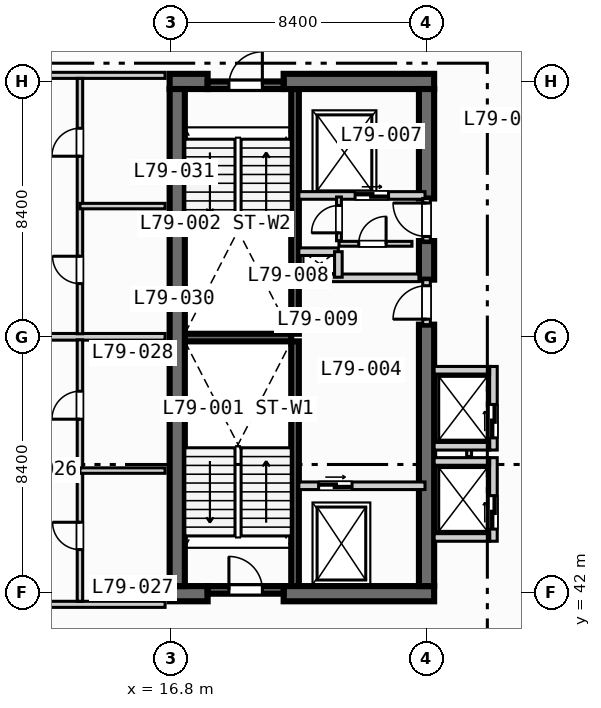
"""IFC4 building model, lengths in metres.
Left out: names, types, materials, properties, quantities, classifications, styles, units other than length and angle.
Written with IfcOpenShell. Run it as: python <this file> out.ifc"""

import sys

from ifc_helpers import new_model, si_unit, direction, frame, frame_2d, origin, place, context, subcontext, project, spatial, rectangle, extrude, element, fill, save


model = new_model("IFC4")
c1 = context("Model", 3, precision=1e-05, world=origin(), true_north=direction((0.0, 1.0)))
c2 = subcontext(c1, "Body", "Model", "MODEL_VIEW")
j1 = project(units=[si_unit("LENGTHUNIT", "METRE"), si_unit("PLANEANGLEUNIT", "RADIAN")], contexts=[c1])
p1 = place(None, origin())
s1 = spatial("IfcSite", under=j1, at=p1, CompositionType="ELEMENT")
p2 = place(p1, origin())
s2 = spatial("IfcBuilding", under=s1, at=p2, CompositionType="ELEMENT")
p3 = place(p2, frame((0.0, 0.0, 320.3)))
s3 = spatial("IfcBuildingStorey", under=s2, at=p3, CompositionType="ELEMENT", Elevation=320.3)
for number, where, z_axis, x_axis in (
    (1, (20.875, 42.2, 0.0), (0.0, 0.0, 1.0), (0.0, 1.0, 0.0)),
    (2, (20.875, 50.5, 0.0), (0.0, 0.0, 1.0), (0.0, 1.0, 0.0)),
):
    element("IfcWall", number, at=place(p3, frame(where, z_axis=z_axis, x_axis=x_axis)), inside=s3, PredefinedType="SOLIDWALL", context=c2, shape_type="SweptSolid", body=[
        extrude(rectangle(XDim=8.05, YDim=0.25, at=frame_2d((4.025, 0.0))), origin(), (0.0, 0.0, 1.0), 3.67),
    ])
p4 = place(p3, frame((17.25, 50.375, 0.0), z_axis=(0.0, 0.0, 1.0), x_axis=(1.0, 0.0, 0.0)))
e3 = element("IfcWall", 3, at=p4, inside=s3, PredefinedType="SOLIDWALL", context=c2, shape_type="SweptSolid", body=[
    extrude(rectangle(XDim=3.5, YDim=0.25, at=frame_2d((1.75, 0.0))), origin(), (0.0, 0.0, 1.0), 3.67),
])
p5 = place(p3, frame((16.75, 41.95, 0.0), z_axis=(0.0, 0.0, 1.0), x_axis=(1.0, 0.0, 0.0)))
e4 = element("IfcWall", 4, at=p5, inside=s3, PredefinedType="SHEAR", context=c2, shape_type="SweptSolid", body=[
    extrude(rectangle(XDim=1.25, YDim=0.5, at=frame_2d((0.625, 0.0))), origin(), (0.0, 0.0, 1.0), 3.67),
])
p6 = place(p3, frame((20.5, 41.95, 0.0), z_axis=(0.0, 0.0, 1.0), x_axis=(1.0, 0.0, 0.0)))
e5 = element("IfcWall", 5, at=p6, inside=s3, PredefinedType="SHEAR", context=c2, shape_type="SweptSolid", body=[
    extrude(rectangle(XDim=4.95, YDim=0.5, at=frame_2d((2.475, 0.0))), origin(), (0.0, 0.0, 1.0), 3.67),
])
p7 = place(p3, frame((16.75, 58.8, 0.0), z_axis=(0.0, 0.0, 1.0), x_axis=(1.0, 0.0, 0.0)))
e6 = element("IfcWall", 6, at=p7, inside=s3, PredefinedType="SHEAR", context=c2, shape_type="SweptSolid", body=[
    extrude(rectangle(XDim=1.25, YDim=0.5, at=frame_2d((0.625, 0.0))), origin(), (0.0, 0.0, 1.0), 3.67),
])
p8 = place(p3, frame((20.5, 58.8, 0.0), z_axis=(0.0, 0.0, 1.0), x_axis=(1.0, 0.0, 0.0)))
e7 = element("IfcWall", 7, at=p8, inside=s3, PredefinedType="SHEAR", context=c2, shape_type="SweptSolid", body=[
    extrude(rectangle(XDim=4.95, YDim=0.5, at=frame_2d((2.475, 0.0))), origin(), (0.0, 0.0, 1.0), 3.67),
])
p9 = place(p3, frame((17.0, 42.2, 0.0), z_axis=(0.0, 0.0, 1.0), x_axis=(0.0, 1.0, 0.0)))
e8 = element("IfcWall", 8, at=p9, inside=s3, PredefinedType="SHEAR", context=c2, shape_type="SweptSolid", body=[
    extrude(rectangle(XDim=16.35, YDim=0.5, at=frame_2d((8.175, 0.0))), origin(), (0.0, 0.0, 1.0), 3.67),
])
p10 = place(p3, frame((25.2, 42.2, 0.0), z_axis=(0.0, 0.0, 1.0), x_axis=(0.0, 1.0, 0.0)))
e9 = element("IfcWall", 9, at=p10, inside=s3, PredefinedType="SHEAR", context=c2, shape_type="SweptSolid", body=[
    extrude(rectangle(XDim=8.6, YDim=0.5, at=frame_2d((4.3, 0.0))), origin(), (0.0, 0.0, 1.0), 3.67),
])
p11 = place(p3, frame((25.2, 52.28, 0.0), z_axis=(0.0, 0.0, 1.0), x_axis=(0.0, 1.0, 0.0)))
e10 = element("IfcWall", 10, at=p11, inside=s3, PredefinedType="SHEAR", context=c2, shape_type="SweptSolid", body=[
    extrude(rectangle(XDim=1.27, YDim=0.5, at=frame_2d((0.635, 0.0))), origin(), (0.0, 0.0, 1.0), 3.67),
])
p12 = place(p3, frame((25.2, 54.95, 0.0), z_axis=(0.0, 0.0, 1.0), x_axis=(0.0, 1.0, 0.0)))
e11 = element("IfcWall", 11, at=p12, inside=s3, PredefinedType="SHEAR", context=c2, shape_type="SweptSolid", body=[
    extrude(rectangle(XDim=3.6, YDim=0.5, at=frame_2d((1.8, 0.0))), origin(), (0.0, 0.0, 1.0), 3.67),
])
p13 = place(p3, frame((18.0, 42.075, 0.0), z_axis=(0.0, 0.0, 1.0), x_axis=(1.0, 0.0, 0.0)))
e12 = element("IfcWall", 12, at=p13, inside=s3, PredefinedType="SOLIDWALL", context=c2, shape_type="SweptSolid", body=[
    extrude(rectangle(XDim=2.5, YDim=0.25, at=frame_2d((1.25, 0.0))), origin(), (0.0, 0.0, 1.0), 3.67),
])
p14 = place(p13, frame((0.7, 0.0, 0.0)))
e13 = element("IfcOpeningElement", 13, at=p14, cuts=e12, PredefinedType="OPENING", context=c2, shape_type="SweptSolid", body=[
    extrude(rectangle(XDim=1.1, YDim=2.15, at=frame_2d((0.55, 1.075))), frame((0.0, 0.135, 0.0), z_axis=(0.0, -1.0, 0.0), x_axis=(1.0, 0.0, 0.0)), (0.0, 0.0, 1.0), 0.27),
])
p15 = place(p3, frame((18.0, 58.675, 0.0), z_axis=(0.0, 0.0, 1.0), x_axis=(1.0, 0.0, 0.0)))
e14 = element("IfcWall", 14, at=p15, inside=s3, PredefinedType="SOLIDWALL", context=c2, shape_type="SweptSolid", body=[
    extrude(rectangle(XDim=2.5, YDim=0.25, at=frame_2d((1.25, 0.0))), origin(), (0.0, 0.0, 1.0), 3.67),
])
p16 = place(p15, frame((0.7, 0.0, 0.0)))
e15 = element("IfcOpeningElement", 15, at=p16, cuts=e14, PredefinedType="OPENING", context=c2, shape_type="SweptSolid", body=[
    extrude(rectangle(XDim=1.1, YDim=2.15, at=frame_2d((0.55, 1.075))), frame((0.0, 0.135, 0.0), z_axis=(0.0, -1.0, 0.0), x_axis=(1.0, 0.0, 0.0)), (0.0, 0.0, 1.0), 0.27),
])
p17 = place(p3, frame((21.0, 45.5, 0.0), z_axis=(0.0, 0.0, 1.0), x_axis=(1.0, 0.0, 0.0)))
e16 = element("IfcWall", 16, at=p17, inside=s3, PredefinedType="SOLIDWALL", context=c2, shape_type="SweptSolid", body=[
    extrude(rectangle(XDim=4.15, YDim=0.25, at=frame_2d((2.075, 0.0))), origin(), (0.0, 0.0, 1.0), 3.67),
])
p18 = place(p17, frame((0.65, 0.0, 0.0)))
e17 = element("IfcOpeningElement", 17, at=p18, cuts=e16, PredefinedType="OPENING", context=c2, shape_type="SweptSolid", body=[
    extrude(rectangle(XDim=1.1, YDim=2.15, at=frame_2d((0.55, 1.075))), frame((0.0, 0.135, 0.0), z_axis=(0.0, -1.0, 0.0), x_axis=(1.0, 0.0, 0.0)), (0.0, 0.0, 1.0), 0.27),
])
p19 = place(p3, frame((25.2, 50.8, 0.0), z_axis=(0.0, 0.0, 1.0), x_axis=(0.0, 1.0, 0.0)))
e18 = element("IfcWall", 18, at=p19, inside=s3, PredefinedType="SOLIDWALL", context=c2, shape_type="SweptSolid", body=[
    extrude(rectangle(XDim=1.48, YDim=0.25, at=frame_2d((0.74, 0.0))), origin(), (0.0, 0.0, 1.0), 3.67),
])
p20 = place(p19, frame((0.18, 0.0, 0.0)))
e19 = element("IfcOpeningElement", 19, at=p20, cuts=e18, PredefinedType="OPENING", context=c2, shape_type="SweptSolid", body=[
    extrude(rectangle(XDim=1.1, YDim=2.15, at=frame_2d((0.55, 1.075))), frame((0.0, 0.135, 0.0), z_axis=(0.0, -1.0, 0.0), x_axis=(1.0, 0.0, 0.0)), (0.0, 0.0, 1.0), 0.27),
])
p21 = place(p3, frame((21.0, 52.34, 0.0), z_axis=(0.0, 0.0, 1.0), x_axis=(1.0, 0.0, 0.0)))
e20 = element("IfcWall", 20, at=p21, inside=s3, PredefinedType="SOLIDWALL", context=c2, shape_type="SweptSolid", body=[
    extrude(rectangle(XDim=3.95, YDim=0.25, at=frame_2d((1.975, 0.0))), origin(), (0.0, 0.0, 1.0), 3.67),
])
p22 = place(p3, frame((21.0, 55.05, 0.0), z_axis=(0.0, 0.0, 1.0), x_axis=(1.0, 0.0, 0.0)))
e21 = element("IfcWall", 21, at=p22, inside=s3, PredefinedType="SOLIDWALL", context=c2, shape_type="SweptSolid", body=[
    extrude(rectangle(XDim=4.15, YDim=0.25, at=frame_2d((2.075, 0.0))), origin(), (0.0, 0.0, 1.0), 3.67),
])
p23 = place(p22, frame((1.85, 0.0, 0.0)))
e22 = element("IfcOpeningElement", 22, at=p23, cuts=e21, PredefinedType="OPENING", context=c2, shape_type="SweptSolid", body=[
    extrude(rectangle(XDim=1.1, YDim=2.15, at=frame_2d((0.55, 1.075))), frame((0.0, 0.135, 0.0), z_axis=(0.0, -1.0, 0.0), x_axis=(1.0, 0.0, 0.0)), (0.0, 0.0, 1.0), 0.27),
])
p24 = place(p3, frame((25.2, 53.55, 0.0), z_axis=(0.0, 0.0, 1.0), x_axis=(0.0, 1.0, 0.0)))
e23 = element("IfcWall", 23, at=p24, inside=s3, PredefinedType="SOLIDWALL", context=c2, shape_type="SweptSolid", body=[
    extrude(rectangle(XDim=1.4, YDim=0.25, at=frame_2d((0.7, 0.0))), origin(), (0.0, 0.0, 1.0), 3.67),
])
p25 = place(p24, frame((0.15, 0.0, 0.0)))
e24 = element("IfcOpeningElement", 24, at=p25, cuts=e23, PredefinedType="OPENING", context=c2, shape_type="SweptSolid", body=[
    extrude(rectangle(XDim=1.1, YDim=2.15, at=frame_2d((0.55, 1.075))), frame((0.0, 0.135, 0.0), z_axis=(0.0, -1.0, 0.0), x_axis=(1.0, 0.0, 0.0)), (0.0, 0.0, 1.0), 0.27),
])
p26 = place(p3, frame((21.0, 53.2, 0.0), z_axis=(0.0, 0.0, 1.0), x_axis=(1.0, 0.0, 0.0)))
e25 = element("IfcWall", 25, at=p26, inside=s3, PredefinedType="SOLIDWALL", context=c2, shape_type="SweptSolid", body=[
    extrude(rectangle(XDim=1.3, YDim=0.25, at=frame_2d((0.65, 0.0))), origin(), (0.0, 0.0, 1.0), 3.67),
])
p27 = place(p3, frame((22.3, 52.36, 0.0), z_axis=(0.0, 0.0, 1.0), x_axis=(0.0, 1.0, 0.0)))
e26 = element("IfcWall", 26, at=p27, inside=s3, PredefinedType="SOLIDWALL", context=c2, shape_type="SweptSolid", body=[
    extrude(rectangle(XDim=0.84, YDim=0.25, at=frame_2d((0.42, 0.0))), origin(), (0.0, 0.0, 1.0), 3.67),
])
p28 = place(p3, frame((22.32, 53.56, 0.0), z_axis=(0.0, 0.0, 1.0), x_axis=(0.0, 1.0, 0.0)))
e27 = element("IfcWall", 27, at=p28, inside=s3, PredefinedType="PARTITIONING", context=c2, shape_type="SweptSolid", body=[
    extrude(rectangle(XDim=1.44, YDim=0.16, at=frame_2d((0.72, 0.0))), origin(), (0.0, 0.0, 1.0), 3.67),
])
p29 = place(p28, frame((0.26, 0.0, 0.0)))
e28 = element("IfcOpeningElement", 28, at=p29, cuts=e27, PredefinedType="OPENING", context=c2, shape_type="SweptSolid", body=[
    extrude(rectangle(XDim=0.9, YDim=2.1, at=frame_2d((0.45, 1.05))), frame((0.0, 0.09, 0.0), z_axis=(0.0, -1.0, 0.0), x_axis=(1.0, 0.0, 0.0)), (0.0, 0.0, 1.0), 0.18),
])
p30 = place(p3, frame((22.32, 53.46, 0.0), z_axis=(0.0, 0.0, 1.0), x_axis=(1.0, 0.0, 0.0)))
e29 = element("IfcWall", 29, at=p30, inside=s3, PredefinedType="PARTITIONING", context=c2, shape_type="SweptSolid", body=[
    extrude(rectangle(XDim=2.4, YDim=0.16, at=frame_2d((1.2, 0.0))), origin(), (0.0, 0.0, 1.0), 3.67),
])
p31 = place(p30, frame((0.65, 0.0, 0.0)))
e30 = element("IfcOpeningElement", 30, at=p31, cuts=e29, PredefinedType="OPENING", context=c2, shape_type="SweptSolid", body=[
    extrude(rectangle(XDim=0.9, YDim=2.1, at=frame_2d((0.45, 1.05))), frame((0.0, 0.09, 0.0), z_axis=(0.0, -1.0, 0.0), x_axis=(1.0, 0.0, 0.0)), (0.0, 0.0, 1.0), 0.18),
])
p32 = place(p3, frame((27.4, 43.675, 0.0), z_axis=(0.0, 0.0, 1.0), x_axis=(0.0, 1.0, 0.0)))
e31 = element("IfcWall", 31, at=p32, inside=s3, PredefinedType="SOLIDWALL", context=c2, shape_type="SweptSolid", body=[
    extrude(rectangle(XDim=2.75, YDim=0.25, at=frame_2d((1.375, 0.0))), origin(), (0.0, 0.0, 1.0), 3.67),
])
p33 = place(p32, frame((0.4, 0.0, 0.0)))
e32 = element("IfcOpeningElement", 32, at=p33, cuts=e31, PredefinedType="OPENING", context=c2, shape_type="SweptSolid", body=[
    extrude(rectangle(XDim=1.1, YDim=2.15, at=frame_2d((0.55, 1.075))), frame((0.0, 0.135, 0.0), z_axis=(0.0, -1.0, 0.0), x_axis=(1.0, 0.0, 0.0)), (0.0, 0.0, 1.0), 0.27),
])
for number, where, z_axis, x_axis in (
    (33, (25.45, 43.8, 0.0), (0.0, 0.0, 1.0), (1.0, 0.0, 0.0)),
    (34, (25.45, 46.3, 0.0), (0.0, 0.0, 1.0), (1.0, 0.0, 0.0)),
):
    element("IfcWall", number, at=place(p3, frame(where, z_axis=z_axis, x_axis=x_axis)), inside=s3, PredefinedType="SOLIDWALL", context=c2, shape_type="SweptSolid", body=[
        extrude(rectangle(XDim=1.825, YDim=0.25, at=frame_2d((0.913, 0.0))), origin(), (0.0, 0.0, 1.0), 3.67),
    ])
p34 = place(p3, frame((26.6, 46.46, 0.0), z_axis=(0.0, 0.0, 1.0), x_axis=(0.0, 1.0, 0.0)))
e35 = element("IfcWall", 35, at=p34, inside=s3, PredefinedType="PARTITIONING", context=c2, shape_type="SweptSolid", body=[
    extrude(rectangle(XDim=0.88, YDim=0.16, at=frame_2d((0.44, 0.0))), origin(), (0.0, 0.0, 1.0), 3.67),
])
p35 = place(p3, frame((27.4, 46.675, 0.0), z_axis=(0.0, 0.0, 1.0), x_axis=(0.0, 1.0, 0.0)))
e36 = element("IfcWall", 36, at=p35, inside=s3, PredefinedType="SOLIDWALL", context=c2, shape_type="SweptSolid", body=[
    extrude(rectangle(XDim=2.75, YDim=0.25, at=frame_2d((1.375, 0.0))), origin(), (0.0, 0.0, 1.0), 3.67),
])
p36 = place(p35, frame((0.4, 0.0, 0.0)))
e37 = element("IfcOpeningElement", 37, at=p36, cuts=e36, PredefinedType="OPENING", context=c2, shape_type="SweptSolid", body=[
    extrude(rectangle(XDim=1.1, YDim=2.15, at=frame_2d((0.55, 1.075))), frame((0.0, 0.135, 0.0), z_axis=(0.0, -1.0, 0.0), x_axis=(1.0, 0.0, 0.0)), (0.0, 0.0, 1.0), 0.27),
])
for number, where, z_axis, x_axis in (
    (38, (25.45, 46.8, 0.0), (0.0, 0.0, 1.0), (1.0, 0.0, 0.0)),
    (39, (25.45, 49.3, 0.0), (0.0, 0.0, 1.0), (1.0, 0.0, 0.0)),
):
    element("IfcWall", number, at=place(p3, frame(where, z_axis=z_axis, x_axis=x_axis)), inside=s3, PredefinedType="SOLIDWALL", context=c2, shape_type="SweptSolid", body=[
        extrude(rectangle(XDim=1.825, YDim=0.25, at=frame_2d((0.913, 0.0))), origin(), (0.0, 0.0, 1.0), 3.67),
    ])
p37 = place(p3, frame((8.65, 41.6, 0.0), z_axis=(0.0, 0.0, 1.0), x_axis=(1.0, 0.0, 0.0)))
e40 = element("IfcWall", 40, at=p37, inside=s3, PredefinedType="PARTITIONING", context=c2, shape_type="SweptSolid", body=[
    extrude(rectangle(XDim=7.95, YDim=0.2, at=frame_2d((3.975, 0.0))), origin(), (0.0, 0.0, 1.0), 3.67),
])
p38 = place(p37, frame((2.0, 0.0, 0.0)))
e41 = element("IfcOpeningElement", 41, at=p38, cuts=e40, PredefinedType="OPENING", context=c2, shape_type="SweptSolid", body=[
    extrude(rectangle(XDim=1.0, YDim=2.15, at=frame_2d((0.5, 1.075))), frame((0.0, 0.11, 0.0), z_axis=(0.0, -1.0, 0.0), x_axis=(1.0, 0.0, 0.0)), (0.0, 0.0, 1.0), 0.22),
])
p39 = place(p3, frame((8.65, 59.0, 0.0), z_axis=(0.0, 0.0, 1.0), x_axis=(1.0, 0.0, 0.0)))
e42 = element("IfcWall", 42, at=p39, inside=s3, PredefinedType="PARTITIONING", context=c2, shape_type="SweptSolid", body=[
    extrude(rectangle(XDim=7.95, YDim=0.2, at=frame_2d((3.975, 0.0))), origin(), (0.0, 0.0, 1.0), 3.253),
])
p40 = place(p39, frame((2.0, 0.0, 0.0)))
e43 = element("IfcOpeningElement", 43, at=p40, cuts=e42, PredefinedType="OPENING", context=c2, shape_type="SweptSolid", body=[
    extrude(rectangle(XDim=1.0, YDim=2.15, at=frame_2d((0.5, 1.075))), frame((0.0, 0.11, 0.0), z_axis=(0.0, -1.0, 0.0), x_axis=(1.0, 0.0, 0.0)), (0.0, 0.0, 1.0), 0.22),
])
p41 = place(p3, frame((8.65, 50.4, 0.0), z_axis=(0.0, 0.0, 1.0), x_axis=(1.0, 0.0, 0.0)))
e44 = element("IfcWall", 44, at=p41, inside=s3, PredefinedType="PARTITIONING", context=c2, shape_type="SweptSolid", body=[
    extrude(rectangle(XDim=7.95, YDim=0.22, at=frame_2d((3.975, 0.0))), origin(), (0.0, 0.0, 1.0), 3.07),
])
p42 = place(p3, frame((13.8, 41.7, 0.0), z_axis=(0.0, 0.0, 1.0), x_axis=(0.0, 1.0, 0.0)))
e45 = element("IfcWall", 45, at=p42, inside=s3, PredefinedType="PLUMBINGWALL", context=c2, shape_type="SweptSolid", body=[
    extrude(rectangle(XDim=8.6, YDim=0.18, at=frame_2d((4.3, 0.0))), origin(), (0.0, 0.0, 1.0), 3.67),
])
p43 = place(p42, frame((1.7, 0.0, 0.0)))
e46 = element("IfcOpeningElement", 46, at=p43, cuts=e45, PredefinedType="OPENING", context=c2, shape_type="SweptSolid", body=[
    extrude(rectangle(XDim=0.9, YDim=2.1, at=frame_2d((0.45, 1.05))), frame((0.0, 0.1, 0.0), z_axis=(0.0, -1.0, 0.0), x_axis=(1.0, 0.0, 0.0)), (0.0, 0.0, 1.0), 0.2),
])
p44 = place(p42, frame((5.99, 0.0, 0.0)))
e47 = element("IfcOpeningElement", 47, at=p44, cuts=e45, PredefinedType="OPENING", context=c2, shape_type="SweptSolid", body=[
    extrude(rectangle(XDim=0.92, YDim=2.1, at=frame_2d((0.46, 1.05))), frame((0.0, 0.1, 0.0), z_axis=(0.0, -1.0, 0.0), x_axis=(1.0, 0.0, 0.0)), (0.0, 0.0, 1.0), 0.2),
])
p45 = place(p3, frame((13.8, 46.0, 0.0), z_axis=(0.0, 0.0, 1.0), x_axis=(1.0, 0.0, 0.0)))
e48 = element("IfcWall", 48, at=p45, inside=s3, PredefinedType="PLUMBINGWALL", context=c2, shape_type="SweptSolid", body=[
    extrude(rectangle(XDim=2.8, YDim=0.18, at=frame_2d((1.4, 0.0))), origin(), (0.0, 0.0, 1.0), 3.67),
])
p46 = place(p3, frame((13.8, 50.5, 0.0), z_axis=(0.0, 0.0, 1.0), x_axis=(0.0, 1.0, 0.0)))
e49 = element("IfcWall", 49, at=p46, inside=s3, PredefinedType="PLUMBINGWALL", context=c2, shape_type="SweptSolid", body=[
    extrude(rectangle(XDim=8.4, YDim=0.18, at=frame_2d((4.2, 0.0))), origin(), (0.0, 0.0, 1.0), 3.67),
])
p47 = place(p46, frame((1.65, 0.0, 0.0)))
e50 = element("IfcOpeningElement", 50, at=p47, cuts=e49, PredefinedType="OPENING", context=c2, shape_type="SweptSolid", body=[
    extrude(rectangle(XDim=0.9, YDim=2.1, at=frame_2d((0.45, 1.05))), frame((0.0, 0.1, 0.0), z_axis=(0.0, -1.0, 0.0), x_axis=(1.0, 0.0, 0.0)), (0.0, 0.0, 1.0), 0.2),
])
p48 = place(p46, frame((5.84, 0.0, 0.0)))
e51 = element("IfcOpeningElement", 51, at=p48, cuts=e49, PredefinedType="OPENING", context=c2, shape_type="SweptSolid", body=[
    extrude(rectangle(XDim=0.92, YDim=2.1, at=frame_2d((0.46, 1.05))), frame((0.0, 0.1, 0.0), z_axis=(0.0, -1.0, 0.0), x_axis=(1.0, 0.0, 0.0)), (0.0, 0.0, 1.0), 0.2),
])
p49 = place(p3, frame((13.8, 54.7, 0.0), z_axis=(0.0, 0.0, 1.0), x_axis=(1.0, 0.0, 0.0)))
e52 = element("IfcWall", 52, at=p49, inside=s3, PredefinedType="PLUMBINGWALL", context=c2, shape_type="SweptSolid", body=[
    extrude(rectangle(XDim=2.8, YDim=0.18, at=frame_2d((1.4, 0.0))), origin(), (0.0, 0.0, 1.0), 3.67),
])
p50 = place(p14, origin())
e53 = element("IfcDoor", 53, at=p50, inside=s3, OperationType="SINGLE_SWING_LEFT", PredefinedType="DOOR", context=c2, shape_type="SweptSolid", body=[
    extrude(rectangle(XDim=1.1, YDim=2.15, at=frame_2d((0.55, 1.075))), frame((0.0, 0.025, 0.0), z_axis=(0.0, -1.0, 0.0), x_axis=(1.0, 0.0, 0.0)), (0.0, 0.0, 1.0), 0.05),
])
fill(e13, e53)
p51 = place(p16, origin())
e54 = element("IfcDoor", 54, at=p51, inside=s3, OperationType="SINGLE_SWING_RIGHT", PredefinedType="DOOR", context=c2, shape_type="SweptSolid", body=[
    extrude(rectangle(XDim=1.1, YDim=2.15, at=frame_2d((0.55, 1.075))), frame((0.0, 0.025, 0.0), z_axis=(0.0, -1.0, 0.0), x_axis=(1.0, 0.0, 0.0)), (0.0, 0.0, 1.0), 0.05),
])
fill(e15, e54)
p52 = place(p18, origin())
e55 = element("IfcDoor", 55, at=p52, inside=s3, OperationType="SLIDING_TO_LEFT", PredefinedType="DOOR", context=c2, shape_type="SweptSolid", body=[
    extrude(rectangle(XDim=1.1, YDim=2.15, at=frame_2d((0.55, 1.075))), frame((0.0, 0.025, 0.0), z_axis=(0.0, -1.0, 0.0), x_axis=(1.0, 0.0, 0.0)), (0.0, 0.0, 1.0), 0.05),
])
fill(e17, e55)
p53 = place(p20, origin())
e56 = element("IfcDoor", 56, at=p53, inside=s3, OperationType="SINGLE_SWING_LEFT", PredefinedType="DOOR", context=c2, shape_type="SweptSolid", body=[
    extrude(rectangle(XDim=1.1, YDim=2.15, at=frame_2d((0.55, 1.075))), frame((0.0, 0.025, 0.0), z_axis=(0.0, -1.0, 0.0), x_axis=(1.0, 0.0, 0.0)), (0.0, 0.0, 1.0), 0.05),
])
fill(e19, e56)
p54 = place(p23, origin())
e57 = element("IfcDoor", 57, at=p54, inside=s3, OperationType="SLIDING_TO_LEFT", PredefinedType="DOOR", context=c2, shape_type="SweptSolid", body=[
    extrude(rectangle(XDim=1.1, YDim=2.15, at=frame_2d((0.55, 1.075))), frame((0.0, 0.025, 0.0), z_axis=(0.0, -1.0, 0.0), x_axis=(1.0, 0.0, 0.0)), (0.0, 0.0, 1.0), 0.05),
])
fill(e22, e57)
p55 = place(p25, origin())
e58 = element("IfcDoor", 58, at=p55, inside=s3, OperationType="SINGLE_SWING_RIGHT", PredefinedType="DOOR", context=c2, shape_type="SweptSolid", body=[
    extrude(rectangle(XDim=1.1, YDim=2.15, at=frame_2d((0.55, 1.075))), frame((0.0, 0.025, 0.0), z_axis=(0.0, -1.0, 0.0), x_axis=(1.0, 0.0, 0.0)), (0.0, 0.0, 1.0), 0.05),
])
fill(e24, e58)
p56 = place(p29, origin())
e59 = element("IfcDoor", 59, at=p56, inside=s3, OperationType="SINGLE_SWING_LEFT", PredefinedType="DOOR", context=c2, shape_type="SweptSolid", body=[
    extrude(rectangle(XDim=0.9, YDim=2.1, at=frame_2d((0.45, 1.05))), frame((0.0, 0.025, 0.0), z_axis=(0.0, -1.0, 0.0), x_axis=(1.0, 0.0, 0.0)), (0.0, 0.0, 1.0), 0.05),
])
fill(e28, e59)
p57 = place(p31, origin())
e60 = element("IfcDoor", 60, at=p57, inside=s3, OperationType="SINGLE_SWING_RIGHT", PredefinedType="DOOR", context=c2, shape_type="SweptSolid", body=[
    extrude(rectangle(XDim=0.9, YDim=2.1, at=frame_2d((0.45, 1.05))), frame((0.0, 0.025, 0.0), z_axis=(0.0, -1.0, 0.0), x_axis=(1.0, 0.0, 0.0)), (0.0, 0.0, 1.0), 0.05),
])
fill(e30, e60)
p58 = place(p33, origin())
e61 = element("IfcDoor", 61, at=p58, inside=s3, OperationType="SLIDING_TO_LEFT", PredefinedType="DOOR", context=c2, shape_type="SweptSolid", body=[
    extrude(rectangle(XDim=1.1, YDim=2.15, at=frame_2d((0.55, 1.075))), frame((0.0, 0.025, 0.0), z_axis=(0.0, -1.0, 0.0), x_axis=(1.0, 0.0, 0.0)), (0.0, 0.0, 1.0), 0.05),
])
fill(e32, e61)
p59 = place(p36, origin())
e62 = element("IfcDoor", 62, at=p59, inside=s3, OperationType="SLIDING_TO_LEFT", PredefinedType="DOOR", context=c2, shape_type="SweptSolid", body=[
    extrude(rectangle(XDim=1.1, YDim=2.15, at=frame_2d((0.55, 1.075))), frame((0.0, 0.025, 0.0), z_axis=(0.0, -1.0, 0.0), x_axis=(1.0, 0.0, 0.0)), (0.0, 0.0, 1.0), 0.05),
])
fill(e37, e62)
p60 = place(p43, origin())
e63 = element("IfcDoor", 63, at=p60, inside=s3, OperationType="SINGLE_SWING_RIGHT", PredefinedType="DOOR", context=c2, shape_type="SweptSolid", body=[
    extrude(rectangle(XDim=0.9, YDim=2.1, at=frame_2d((0.45, 1.05))), frame((0.0, 0.025, 0.0), z_axis=(0.0, -1.0, 0.0), x_axis=(1.0, 0.0, 0.0)), (0.0, 0.0, 1.0), 0.05),
])
fill(e46, e63)
p61 = place(p44, origin())
e64 = element("IfcDoor", 64, at=p61, inside=s3, OperationType="SINGLE_SWING_LEFT", PredefinedType="DOOR", context=c2, shape_type="SweptSolid", body=[
    extrude(rectangle(XDim=0.92, YDim=2.1, at=frame_2d((0.46, 1.05))), frame((0.0, 0.025, 0.0), z_axis=(0.0, -1.0, 0.0), x_axis=(1.0, 0.0, 0.0)), (0.0, 0.0, 1.0), 0.05),
])
fill(e47, e64)
p62 = place(p47, origin())
e65 = element("IfcDoor", 65, at=p62, inside=s3, OperationType="SINGLE_SWING_RIGHT", PredefinedType="DOOR", context=c2, shape_type="SweptSolid", body=[
    extrude(rectangle(XDim=0.9, YDim=2.1, at=frame_2d((0.45, 1.05))), frame((0.0, 0.025, 0.0), z_axis=(0.0, -1.0, 0.0), x_axis=(1.0, 0.0, 0.0)), (0.0, 0.0, 1.0), 0.05),
])
fill(e50, e65)
p63 = place(p48, origin())
e66 = element("IfcDoor", 66, at=p63, inside=s3, OperationType="SINGLE_SWING_LEFT", PredefinedType="DOOR", context=c2, shape_type="SweptSolid", body=[
    extrude(rectangle(XDim=0.92, YDim=2.1, at=frame_2d((0.46, 1.05))), frame((0.0, 0.025, 0.0), z_axis=(0.0, -1.0, 0.0), x_axis=(1.0, 0.0, 0.0)), (0.0, 0.0, 1.0), 0.05),
])
fill(e51, e66)
save(model, sys.argv[1])
